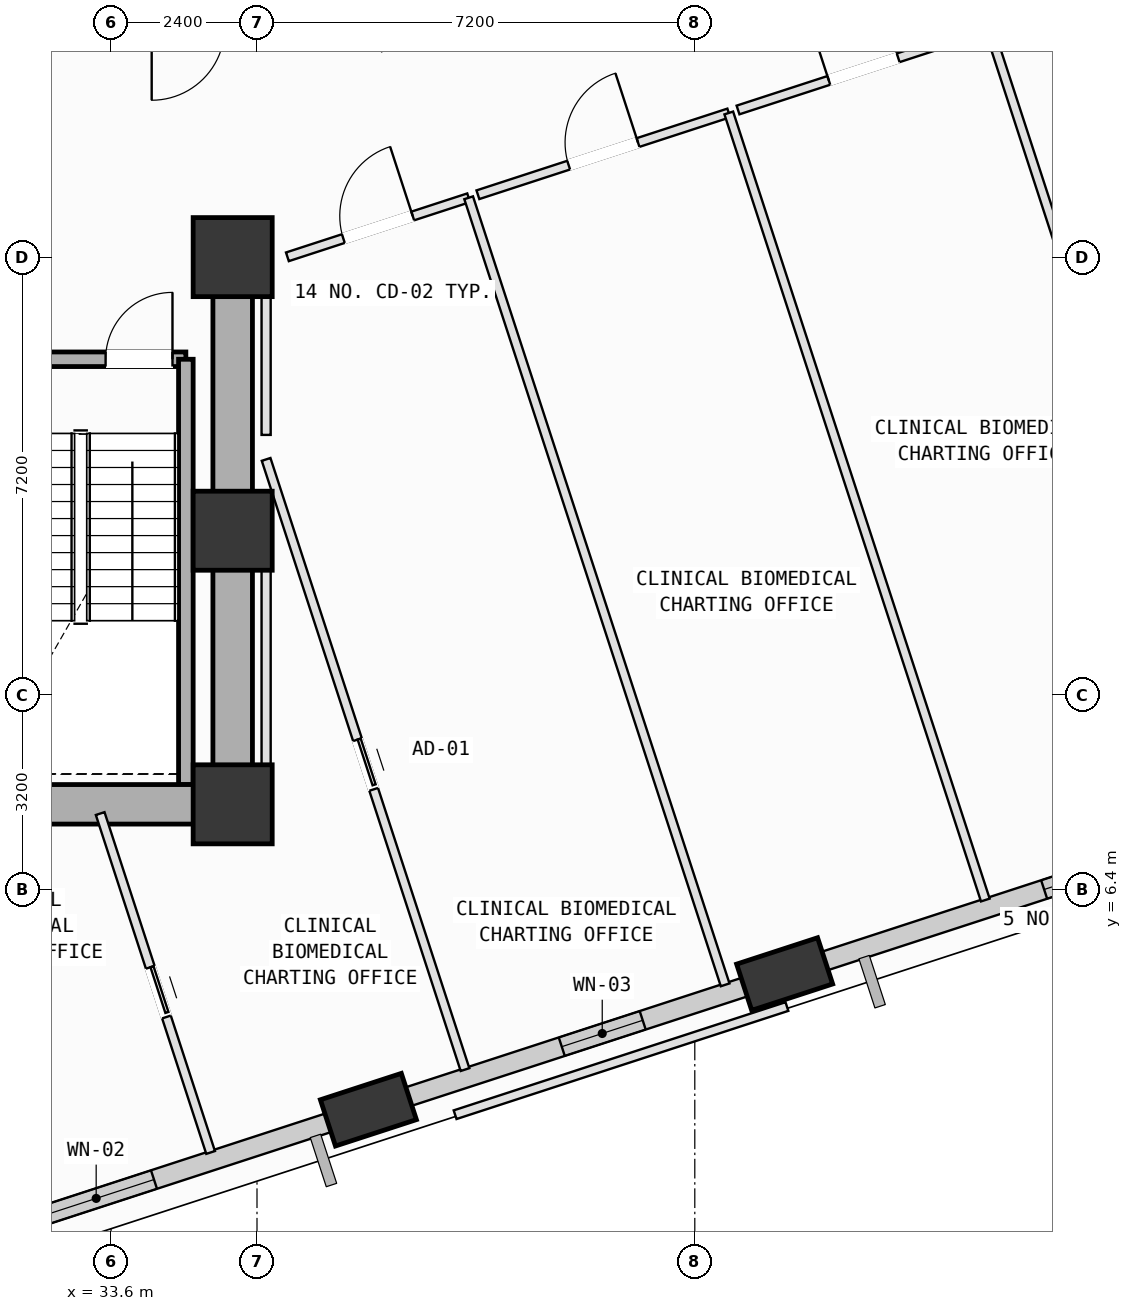
"""IFC4 building model, lengths in metres.
Left out: names, types, materials, properties, quantities, classifications, styles, units other than length and angle.
Written with IfcOpenShell. Run it as: python <this file> out.ifc"""

import sys

from ifc_helpers import new_model, si_unit, direction, frame, frame_2d, origin, origin_2d, place, context, subcontext, project, spatial, rectangle, extrude, element, fill, save


model = new_model("IFC4")
c1 = context("Model", 3, precision=1e-05, world=origin(), true_north=direction((0.0, 1.0)))
c2 = subcontext(c1, "Body", "Model", "MODEL_VIEW")
j1 = project(units=[si_unit("LENGTHUNIT", "METRE"), si_unit("PLANEANGLEUNIT", "RADIAN")], contexts=[c1])
p1 = place(None, origin())
s1 = spatial("IfcSite", under=j1, at=p1, CompositionType="ELEMENT")
p2 = place(p1, origin())
s2 = spatial("IfcBuilding", under=s1, at=p2, CompositionType="ELEMENT")
p3 = place(p2, frame((0.0, 0.0, 100.4)))
s3 = spatial("IfcBuildingStorey", under=s2, at=p3, CompositionType="ELEMENT", Elevation=100.4)
for number, where, z_axis, x_axis in (
    (1, (35.6, 7.8, 0.0), (0.0, 0.0, 1.0), (1.0, 0.0, 0.0)),
    (2, (35.6, 12.3, 0.0), (0.0, 0.0, 1.0), (1.0, 0.0, 0.0)),
    (3, (35.6, 16.8, 0.0), (0.0, 0.0, 1.0), (1.0, 0.0, 0.0)),
):
    element("IfcColumn", number, at=place(p3, frame(where, z_axis=z_axis, x_axis=x_axis)), inside=s3, PredefinedType="COLUMN", context=c2, shape_type="SweptSolid", body=[
        extrude(rectangle(XDim=1.3, YDim=1.3, at=origin_2d()), origin(), (0.0, 0.0, 1.0), 4.0),
    ])
p4 = place(p3, frame((37.832, 2.777, 0.002), z_axis=(0.090756503564, 0.018248626722, 0.995705902706), x_axis=(-0.489888231035, 0.871313250925, 0.028683442203)))
e4 = element("IfcColumn", 4, at=p4, inside=s3, PredefinedType="COLUMN", context=c2, shape_type="SweptSolid", body=[
    extrude(rectangle(XDim=1.4, YDim=0.8, at=origin_2d()), origin(), (0.0, 0.0, 1.0), 4.014),
])
p5 = place(p3, frame((44.678, 5.008, 0.002), z_axis=(0.081259550756, 0.046407961996, 0.995611965815), x_axis=(-0.739401442167, 0.672640177904, 0.028994799376)))
e5 = element("IfcColumn", 5, at=p5, inside=s3, PredefinedType="COLUMN", context=c2, shape_type="SweptSolid", body=[
    extrude(rectangle(XDim=1.4, YDim=0.8, at=origin_2d()), origin(), (0.0, 0.0, 1.0), 4.014),
])
p6 = place(p3, frame((37.536, 2.681, 0.0), z_axis=(0.0, 0.0, 1.0), x_axis=(-0.950795017796, -0.309820648334, 0.0)))
e6 = element("IfcWall", 6, at=p6, inside=s3, PredefinedType="SOLIDWALL", context=c2, shape_type="SweptSolid", body=[
    extrude(rectangle(XDim=6.214, YDim=0.32, at=frame_2d((3.107, 0.0))), origin(), (0.0, 0.0, 1.0), 3.165),
])
p7 = place(p6, frame((3.397, 0.0, 0.75)))
e7 = element("IfcOpeningElement", 7, at=p7, cuts=e6, PredefinedType="OPENING", context=c2, shape_type="SweptSolid", body=[
    extrude(rectangle(XDim=2.0, YDim=1.95, at=frame_2d((1.0, 0.975))), frame((0.0, 0.17, 0.0), z_axis=(0.0, -1.0, 0.0), x_axis=(1.0, 0.0, 0.0)), (0.0, 0.0, 1.0), 0.34),
])
p8 = place(p3, frame((44.382, 4.912, 0.0), z_axis=(0.0, 0.0, 1.0), x_axis=(-0.950785253493, -0.309850611974, 0.0)))
e8 = element("IfcWall", 8, at=p8, inside=s3, PredefinedType="SOLIDWALL", context=c2, shape_type="SweptSolid", body=[
    extrude(rectangle(XDim=6.209, YDim=0.32, at=frame_2d((3.104, 0.0))), origin(), (0.0, 0.0, 1.0), 3.165),
])
p9 = place(p8, frame((2.144, 0.0, 0.75)))
e9 = element("IfcOpeningElement", 9, at=p9, cuts=e8, PredefinedType="OPENING", context=c2, shape_type="SweptSolid", body=[
    extrude(rectangle(XDim=1.4, YDim=1.85, at=frame_2d((0.7, 0.925))), frame((0.0, 0.17, 0.0), z_axis=(0.0, -1.0, 0.0), x_axis=(1.0, 0.0, 0.0)), (0.0, 0.0, 1.0), 0.34),
])
p10 = place(p3, frame((51.235, 7.146, 0.0), z_axis=(0.0, 0.0, 1.0), x_axis=(-0.950785923173, -0.309848557034, 0.0)))
e10 = element("IfcWall", 10, at=p10, inside=s3, PredefinedType="SOLIDWALL", context=c2, shape_type="SweptSolid", body=[
    extrude(rectangle(XDim=6.219, YDim=0.32, at=frame_2d((3.109, 0.0))), origin(), (0.0, 0.0, 1.0), 3.165),
])
p11 = place(p10, frame((0.608, 0.0, 0.75)))
e11 = element("IfcOpeningElement", 11, at=p11, cuts=e10, PredefinedType="OPENING", context=c2, shape_type="SweptSolid", body=[
    extrude(rectangle(XDim=1.8, YDim=2.05, at=frame_2d((0.9, 1.025))), frame((0.0, 0.17, 0.0), z_axis=(0.0, -1.0, 0.0), x_axis=(1.0, 0.0, 0.0)), (0.0, 0.0, 1.0), 0.34),
])
p12 = place(p3, frame((31.37, 15.12, 0.0), z_axis=(0.0, 0.0, 1.0), x_axis=(1.0, 0.0, 0.0)))
e12 = element("IfcWall", 12, at=p12, inside=s3, PredefinedType="SOLIDWALL", context=c2, shape_type="SweptSolid", body=[
    extrude(rectangle(XDim=3.46, YDim=0.24, at=frame_2d((1.73, 0.0))), origin(), (0.0, 0.0, 1.0), 3.78),
])
p13 = place(p12, frame((2.14, 0.0, 0.0)))
e13 = element("IfcOpeningElement", 13, at=p13, cuts=e12, PredefinedType="OPENING", context=c2, shape_type="SweptSolid", body=[
    extrude(rectangle(XDim=1.1, YDim=2.15, at=frame_2d((0.55, 1.075))), frame((0.0, 0.13, 0.0), z_axis=(0.0, -1.0, 0.0), x_axis=(1.0, 0.0, 0.0)), (0.0, 0.0, 1.0), 0.26),
])
p14 = place(p3, frame((34.83, 15.12, 0.0), z_axis=(0.0, 0.0, 1.0), x_axis=(0.0, -1.0, 0.0)))
e14 = element("IfcWall", 14, at=p14, inside=s3, PredefinedType="SOLIDWALL", context=c2, shape_type="SweptSolid", body=[
    extrude(rectangle(XDim=6.995, YDim=0.24, at=frame_2d((3.498, 0.0))), origin(), (0.0, 0.0, 1.0), 3.78),
])
p15 = place(p3, frame((24.8, 7.8, 0.0), z_axis=(0.0, 0.0, 1.0), x_axis=(1.0, 0.0, 0.0)))
e15 = element("IfcWall", 15, at=p15, inside=s3, PredefinedType="SHEAR", context=c2, shape_type="SweptSolid", body=[
    extrude(rectangle(XDim=10.8, YDim=0.65, at=frame_2d((5.4, 0.0))), origin(), (0.0, 0.0, 1.0), 3.78),
])
p16 = place(p3, frame((35.6, 7.8, 0.0), z_axis=(0.0, 0.0, 1.0), x_axis=(0.0, 1.0, 0.0)))
e16 = element("IfcWall", 16, at=p16, inside=s3, PredefinedType="SHEAR", context=c2, shape_type="SweptSolid", body=[
    extrude(rectangle(XDim=9.0, YDim=0.65, at=frame_2d((4.5, 0.0))), origin(), (0.0, 0.0, 1.0), 3.78),
])
p17 = place(p3, frame((33.421, 7.648, 0.0), z_axis=(0.0, 0.0, 1.0), x_axis=(0.309798827462, -0.950802127944, 0.0)))
e17 = element("IfcWall", 17, at=p17, inside=s3, PredefinedType="PARTITIONING", context=c2, shape_type="SweptSolid", body=[
    extrude(rectangle(XDim=5.862, YDim=0.15, at=frame_2d((2.931, 0.0))), origin(), (0.0, 0.0, 1.0), 3.78),
])
p18 = place(p17, frame((2.659, 0.0, 0.0)))
e18 = element("IfcOpeningElement", 18, at=p18, cuts=e17, PredefinedType="OPENING", context=c2, shape_type="SweptSolid", body=[
    extrude(rectangle(XDim=0.86, YDim=2.06, at=frame_2d((0.43, 1.03))), frame((0.0, 0.085, 0.0), z_axis=(0.0, -1.0, 0.0), x_axis=(1.0, 0.0, 0.0)), (0.0, 0.0, 1.0), 0.17),
])
p19 = place(p3, frame((36.15, 13.473, 0.0), z_axis=(0.0, 0.0, 1.0), x_axis=(0.309885615187, -0.950773845612, 0.0)))
e19 = element("IfcWall", 19, at=p19, inside=s3, PredefinedType="PARTITIONING", context=c2, shape_type="SweptSolid", body=[
    extrude(rectangle(XDim=10.555, YDim=0.15, at=frame_2d((5.278, 0.0))), origin(), (0.0, 0.0, 1.0), 3.78),
])
p20 = place(p19, frame((4.848, 0.0, 0.0)))
e20 = element("IfcOpeningElement", 20, at=p20, cuts=e19, PredefinedType="OPENING", context=c2, shape_type="SweptSolid", body=[
    extrude(rectangle(XDim=0.86, YDim=2.06, at=frame_2d((0.43, 1.03))), frame((0.0, 0.085, 0.0), z_axis=(0.0, -1.0, 0.0), x_axis=(1.0, 0.0, 0.0)), (0.0, 0.0, 1.0), 0.17),
])
p21 = place(p3, frame((38.55, 2.769, 0.0), z_axis=(0.0, 0.0, 1.0), x_axis=(-0.950851208403, -0.309648154328, 0.0)))
e21 = element("IfcWall", 21, at=p21, inside=s3, PredefinedType="PARTITIONING", context=c2, shape_type="SweptSolid", body=[
    extrude(rectangle(XDim=0.992, YDim=0.15, at=frame_2d((0.496, 0.0))), origin(), (0.0, 0.0, 1.0), 3.165),
])
p22 = place(p3, frame((35.6, 7.5, 0.0), z_axis=(0.0, 0.0, 1.0), x_axis=(1.0, 0.0, 0.0)))
e22 = element("IfcWall", 22, at=p22, inside=s3, PredefinedType="PARTITIONING", context=c2, shape_type="SweptSolid", body=[
    extrude(rectangle(XDim=0.55, YDim=0.15, at=frame_2d((0.275, 0.0))), origin(), (0.0, 0.0, 1.0), 2.965),
])
p23 = place(p3, frame((36.15, 7.5, 0.0), z_axis=(0.0, 0.0, 1.0), x_axis=(0.0, 1.0, 0.0)))
e23 = element("IfcWall", 23, at=p23, inside=s3, PredefinedType="PARTITIONING", context=c2, shape_type="SweptSolid", body=[
    extrude(rectangle(XDim=5.134, YDim=0.15, at=frame_2d((2.567, 0.0))), origin(), (0.0, 0.0, 1.0), 3.78),
])
p24 = place(p3, frame((36.5, 16.805, 0.0), z_axis=(0.0, 0.0, 1.0), x_axis=(0.950833572982, 0.30970230301, 0.0)))
e24 = element("IfcWall", 24, at=p24, inside=s3, PredefinedType="PARTITIONING", context=c2, shape_type="SweptSolid", body=[
    extrude(rectangle(XDim=3.135, YDim=0.15, at=frame_2d((1.567, 0.0))), origin(), (0.0, 0.0, 1.0), 2.965),
])
p25 = place(p24, frame((0.968, 0.0, 0.0)))
e25 = element("IfcOpeningElement", 25, at=p25, cuts=e24, PredefinedType="OPENING", context=c2, shape_type="SweptSolid", body=[
    extrude(rectangle(XDim=1.2, YDim=2.15, at=frame_2d((0.6, 1.075))), frame((0.0, 0.085, 0.0), z_axis=(0.0, -1.0, 0.0), x_axis=(1.0, 0.0, 0.0)), (0.0, 0.0, 1.0), 0.17),
])
p26 = place(p3, frame((39.481, 17.776, 0.0), z_axis=(0.0, 0.0, 1.0), x_axis=(0.309813403984, -0.950797378368, 0.0)))
e26 = element("IfcWall", 26, at=p26, inside=s3, PredefinedType="PARTITIONING", context=c2, shape_type="SweptSolid", body=[
    extrude(rectangle(XDim=13.615, YDim=0.15, at=frame_2d((6.807, 0.0))), origin(), (0.0, 0.0, 1.0), 3.78),
])
p27 = place(p3, frame((36.15, 13.876, 0.0), z_axis=(0.0, 0.0, 1.0), x_axis=(0.0, 1.0, 0.0)))
e27 = element("IfcWall", 27, at=p27, inside=s3, PredefinedType="PARTITIONING", context=c2, shape_type="SweptSolid", body=[
    extrude(rectangle(XDim=2.624, YDim=0.15, at=frame_2d((1.312, 0.0))), origin(), (0.0, 0.0, 1.0), 3.78),
])
p28 = place(p3, frame((39.633, 17.826, 0.0), z_axis=(0.0, 0.0, 1.0), x_axis=(0.950760835526, 0.309925529167, 0.0)))
e28 = element("IfcWall", 28, at=p28, inside=s3, PredefinedType="PARTITIONING", context=c2, shape_type="SweptSolid", body=[
    extrude(rectangle(XDim=4.34, YDim=0.15, at=frame_2d((2.17, 0.0))), origin(), (0.0, 0.0, 1.0), 2.965),
])
p29 = place(p28, frame((1.57, 0.0, 0.0)))
e29 = element("IfcOpeningElement", 29, at=p29, cuts=e28, PredefinedType="OPENING", context=c2, shape_type="SweptSolid", body=[
    extrude(rectangle(XDim=1.2, YDim=2.15, at=frame_2d((0.6, 1.075))), frame((0.0, 0.085, 0.0), z_axis=(0.0, -1.0, 0.0), x_axis=(1.0, 0.0, 0.0)), (0.0, 0.0, 1.0), 0.17),
])
p30 = place(p3, frame((43.759, 19.171, 0.0), z_axis=(0.0, 0.0, 1.0), x_axis=(0.309878245527, -0.950776247573, 0.0)))
e30 = element("IfcWall", 30, at=p30, inside=s3, PredefinedType="PARTITIONING", context=c2, shape_type="SweptSolid", body=[
    extrude(rectangle(XDim=13.615, YDim=0.15, at=frame_2d((6.808, 0.0))), origin(), (0.0, 0.0, 1.0), 3.78),
])
p31 = place(p3, frame((45.394, 5.0, 0.0), z_axis=(0.0, 0.0, 1.0), x_axis=(-0.951025003629, -0.309113963566, 0.0)))
e31 = element("IfcWall", 31, at=p31, inside=s3, PredefinedType="PARTITIONING", context=c2, shape_type="SweptSolid", body=[
    extrude(rectangle(XDim=0.99, YDim=0.15, at=frame_2d((0.495, 0.0))), origin(), (0.0, 0.0, 1.0), 3.165),
])
p32 = place(p3, frame((43.911, 19.22, 0.0), z_axis=(0.0, 0.0, 1.0), x_axis=(0.950787843692, 0.309842663762, 0.0)))
e32 = element("IfcWall", 32, at=p32, inside=s3, PredefinedType="PARTITIONING", context=c2, shape_type="SweptSolid", body=[
    extrude(rectangle(XDim=4.341, YDim=0.15, at=frame_2d((2.17, 0.0))), origin(), (0.0, 0.0, 1.0), 3.78),
])
p33 = place(p32, frame((1.57, 0.0, 0.0)))
e33 = element("IfcOpeningElement", 33, at=p33, cuts=e32, PredefinedType="OPENING", context=c2, shape_type="SweptSolid", body=[
    extrude(rectangle(XDim=1.2, YDim=2.15, at=frame_2d((0.6, 1.075))), frame((0.0, 0.085, 0.0), z_axis=(0.0, -1.0, 0.0), x_axis=(1.0, 0.0, 0.0)), (0.0, 0.0, 1.0), 0.17),
])
p34 = place(p3, frame((48.038, 20.565, 0.0), z_axis=(0.0, 0.0, 1.0), x_axis=(0.309813403984, -0.950797378368, 0.0)))
e34 = element("IfcWall", 34, at=p34, inside=s3, PredefinedType="PARTITIONING", context=c2, shape_type="SweptSolid", body=[
    extrude(rectangle(XDim=13.615, YDim=0.15, at=frame_2d((6.807, 0.0))), origin(), (0.0, 0.0, 1.0), 3.78),
])
p35 = place(p3, frame((44.715, 4.474, 0.0), z_axis=(0.0, 0.0, 1.0), x_axis=(-0.950751095858, -0.309955406027, 0.0)))
e35 = element("IfcWall", 35, at=p35, inside=s3, PredefinedType="PARTITIONING", context=c2, shape_type="SweptSolid", body=[
    extrude(rectangle(XDim=5.74, YDim=0.15, at=frame_2d((2.87, 0.0))), origin(), (0.0, 0.0, 1.0), 3.78),
])
p36 = place(p7, origin())
e36 = element("IfcWindow", 36, at=p36, inside=s3, PartitioningType="SINGLE_PANEL", PredefinedType="WINDOW", context=c2, shape_type="SweptSolid", body=[
    extrude(rectangle(XDim=2.0, YDim=1.95, at=frame_2d((1.0, 0.975))), frame((0.0, 0.03, 0.0), z_axis=(0.0, -1.0, 0.0), x_axis=(1.0, 0.0, 0.0)), (0.0, 0.0, 1.0), 0.06),
])
fill(e7, e36)
p37 = place(p9, origin())
e37 = element("IfcWindow", 37, at=p37, inside=s3, PartitioningType="SINGLE_PANEL", PredefinedType="WINDOW", context=c2, shape_type="SweptSolid", body=[
    extrude(rectangle(XDim=1.4, YDim=1.85, at=frame_2d((0.7, 0.925))), frame((0.0, 0.03, 0.0), z_axis=(0.0, -1.0, 0.0), x_axis=(1.0, 0.0, 0.0)), (0.0, 0.0, 1.0), 0.06),
])
fill(e9, e37)
p38 = place(p11, origin())
e38 = element("IfcWindow", 38, at=p38, inside=s3, PartitioningType="SINGLE_PANEL", PredefinedType="WINDOW", context=c2, shape_type="SweptSolid", body=[
    extrude(rectangle(XDim=1.8, YDim=2.05, at=frame_2d((0.9, 1.025))), frame((0.0, 0.03, 0.0), z_axis=(0.0, -1.0, 0.0), x_axis=(1.0, 0.0, 0.0)), (0.0, 0.0, 1.0), 0.06),
])
fill(e11, e38)
p39 = place(p13, origin())
e39 = element("IfcDoor", 39, at=p39, inside=s3, OperationType="SINGLE_SWING_RIGHT", PredefinedType="DOOR", context=c2, shape_type="SweptSolid", body=[
    extrude(rectangle(XDim=1.1, YDim=2.15, at=frame_2d((0.55, 1.075))), frame((0.0, 0.025, 0.0), z_axis=(0.0, -1.0, 0.0), x_axis=(1.0, 0.0, 0.0)), (0.0, 0.0, 1.0), 0.05),
])
fill(e13, e39)
p40 = place(p25, origin())
e40 = element("IfcDoor", 40, at=p40, inside=s3, OperationType="SINGLE_SWING_RIGHT", PredefinedType="DOOR", context=c2, shape_type="SweptSolid", body=[
    extrude(rectangle(XDim=1.2, YDim=2.15, at=frame_2d((0.6, 1.075))), frame((0.0, 0.025, 0.0), z_axis=(0.0, -1.0, 0.0), x_axis=(1.0, 0.0, 0.0)), (0.0, 0.0, 1.0), 0.05),
])
fill(e25, e40)
p41 = place(p29, origin())
e41 = element("IfcDoor", 41, at=p41, inside=s3, OperationType="SINGLE_SWING_RIGHT", PredefinedType="DOOR", context=c2, shape_type="SweptSolid", body=[
    extrude(rectangle(XDim=1.2, YDim=2.15, at=frame_2d((0.6, 1.075))), frame((0.0, 0.025, 0.0), z_axis=(0.0, -1.0, 0.0), x_axis=(1.0, 0.0, 0.0)), (0.0, 0.0, 1.0), 0.05),
])
fill(e29, e41)
p42 = place(p33, origin())
e42 = element("IfcDoor", 42, at=p42, inside=s3, OperationType="SINGLE_SWING_LEFT", PredefinedType="DOOR", context=c2, shape_type="SweptSolid", body=[
    extrude(rectangle(XDim=1.2, YDim=2.15, at=frame_2d((0.6, 1.075))), frame((0.0, 0.025, 0.0), z_axis=(0.0, -1.0, 0.0), x_axis=(1.0, 0.0, 0.0)), (0.0, 0.0, 1.0), 0.05),
])
fill(e33, e42)
p43 = place(p20, origin())
e43 = element("IfcDoor", 43, at=p43, inside=s3, OperationType="SLIDING_TO_LEFT", PredefinedType="DOOR", context=c2, shape_type="SweptSolid", body=[
    extrude(rectangle(XDim=0.86, YDim=2.06, at=frame_2d((0.43, 1.03))), frame((0.0, 0.025, 0.0), z_axis=(0.0, -1.0, 0.0), x_axis=(1.0, 0.0, 0.0)), (0.0, 0.0, 1.0), 0.05),
])
fill(e20, e43)
p44 = place(p18, origin())
e44 = element("IfcDoor", 44, at=p44, inside=s3, OperationType="SLIDING_TO_LEFT", PredefinedType="DOOR", context=c2, shape_type="SweptSolid", body=[
    extrude(rectangle(XDim=0.86, YDim=2.06, at=frame_2d((0.43, 1.03))), frame((0.0, 0.025, 0.0), z_axis=(0.0, -1.0, 0.0), x_axis=(1.0, 0.0, 0.0)), (0.0, 0.0, 1.0), 0.05),
])
fill(e18, e44)
save(model, sys.argv[1])
